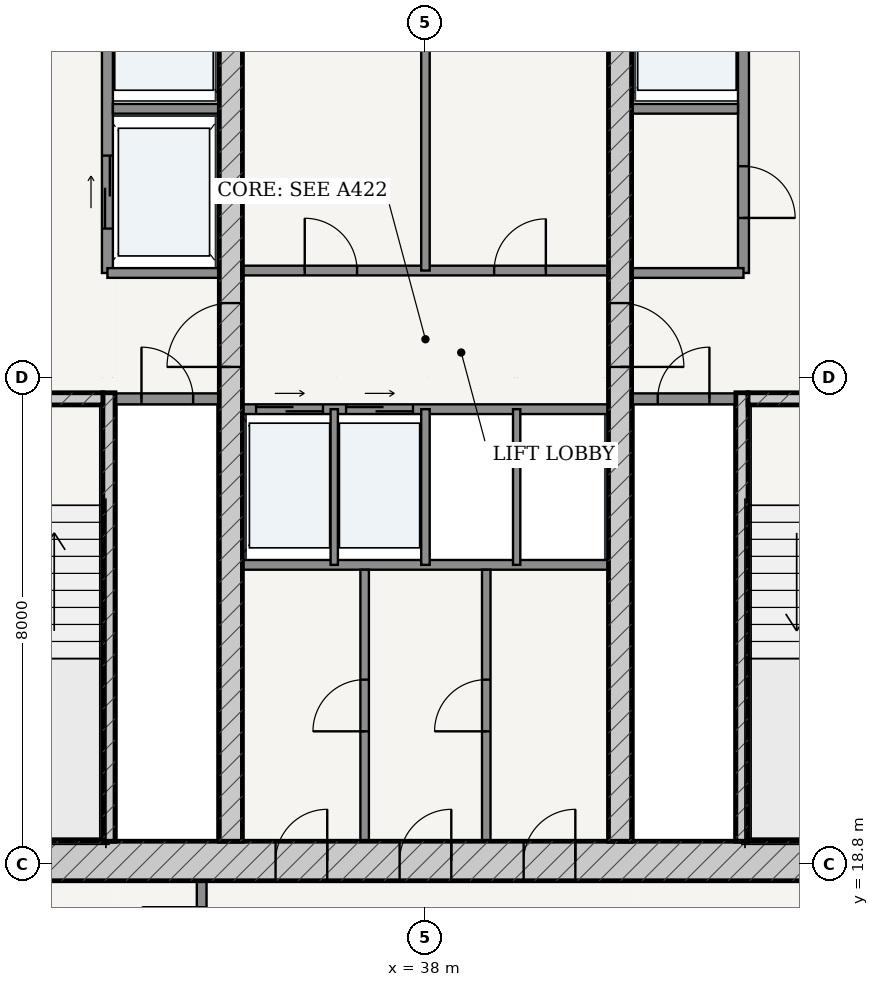
"""IFC4 building model, lengths in metres.
Left out: names, types, materials, properties, quantities, classifications, styles, units other than length and angle.
Written with IfcOpenShell. Run it as: python <this file> out.ifc"""

import sys

from ifc_helpers import new_model, si_unit, direction, frame, frame_2d, origin, place, context, subcontext, project, spatial, rectangle, extrude, source, transform, mapped, element, fill, save


model = new_model("IFC4")
c1 = context("Model", 3, precision=1e-05, world=origin(), true_north=direction((-0.2419218956, 0.970295726276)))
c2 = subcontext(c1, "Body", "Model", "MODEL_VIEW")
j1 = project(units=[si_unit("LENGTHUNIT", "METRE"), si_unit("PLANEANGLEUNIT", "RADIAN")], contexts=[c1])
p1 = place(None, origin())
s1 = spatial("IfcSite", under=j1, at=p1, CompositionType="ELEMENT")
p2 = place(p1, origin())
s2 = spatial("IfcBuilding", under=s1, at=p2, CompositionType="ELEMENT")
p3 = place(p2, frame((0.0, 0.0, 142.6)))
s3 = spatial("IfcBuildingStorey", under=s2, at=p3, CompositionType="ELEMENT", Elevation=142.6)
p4 = place(p3, frame((28.725, 18.85, 0.0), z_axis=(0.0, 0.0, 1.0), x_axis=(1.0, 0.0, 0.0)))
e1 = element("IfcWall", 1, at=p4, inside=s3, PredefinedType="SHEAR", context=c2, shape_type="SweptSolid", body=[
    extrude(rectangle(XDim=18.55, YDim=0.65, at=frame_2d((9.275, 0.0))), origin(), (0.0, 0.0, 1.0), 3.33),
])
p5 = place(p4, frame((6.81, 0.0, 0.0)))
e2 = element("IfcOpeningElement", 2, at=p5, cuts=e1, PredefinedType="OPENING", context=c2, shape_type="SweptSolid", body=[
    extrude(rectangle(XDim=0.85, YDim=2.1, at=frame_2d((0.425, 1.05))), frame((0.0, 0.335, 0.0), z_axis=(0.0, -1.0, 0.0), x_axis=(1.0, 0.0, 0.0)), (0.0, 0.0, 1.0), 0.67),
])
p6 = place(p4, frame((8.85, 0.0, 0.0)))
e3 = element("IfcOpeningElement", 3, at=p6, cuts=e1, PredefinedType="OPENING", context=c2, shape_type="SweptSolid", body=[
    extrude(rectangle(XDim=0.85, YDim=2.1, at=frame_2d((0.425, 1.05))), frame((0.0, 0.335, 0.0), z_axis=(0.0, -1.0, 0.0), x_axis=(1.0, 0.0, 0.0)), (0.0, 0.0, 1.0), 0.67),
])
p7 = place(p4, frame((10.89, 0.0, 0.0)))
e4 = element("IfcOpeningElement", 4, at=p7, cuts=e1, PredefinedType="OPENING", context=c2, shape_type="SweptSolid", body=[
    extrude(rectangle(XDim=0.85, YDim=2.1, at=frame_2d((0.425, 1.05))), frame((0.0, 0.335, 0.0), z_axis=(0.0, -1.0, 0.0), x_axis=(1.0, 0.0, 0.0)), (0.0, 0.0, 1.0), 0.67),
])
p8 = place(p3, frame((32.795, 19.175, 0.0), z_axis=(0.0, 0.0, 1.0), x_axis=(0.0, 1.0, 0.0)))
e5 = element("IfcWall", 5, at=p8, inside=s3, PredefinedType="SOLIDWALL", context=c2, shape_type="SweptSolid", body=[
    extrude(rectangle(XDim=7.375, YDim=0.2, at=frame_2d((3.688, 0.0))), origin(), (0.0, 0.0, 1.0), 3.33),
])
p9 = place(p3, frame((29.375, 26.45, 0.0), z_axis=(0.0, 0.0, 1.0), x_axis=(1.0, 0.0, 0.0)))
e6 = element("IfcWall", 6, at=p9, inside=s3, PredefinedType="SOLIDWALL", context=c2, shape_type="SweptSolid", body=[
    extrude(rectangle(XDim=3.32, YDim=0.2, at=frame_2d((1.66, 0.0))), origin(), (0.0, 0.0, 1.0), 3.33),
])
p10 = place(p9, frame((1.185, 0.0, 0.0)))
e7 = element("IfcOpeningElement", 7, at=p10, cuts=e6, PredefinedType="OPENING", context=c2, shape_type="SweptSolid", body=[
    extrude(rectangle(XDim=0.95, YDim=2.15, at=frame_2d((0.475, 1.075))), frame((0.0, 0.11, 0.0), z_axis=(0.0, -1.0, 0.0), x_axis=(1.0, 0.0, 0.0)), (0.0, 0.0, 1.0), 0.22),
])
p11 = place(p3, frame((43.205, 19.175, 0.0), z_axis=(0.0, 0.0, 1.0), x_axis=(0.0, 1.0, 0.0)))
e8 = element("IfcWall", 8, at=p11, inside=s3, PredefinedType="SOLIDWALL", context=c2, shape_type="SweptSolid", body=[
    extrude(rectangle(XDim=7.375, YDim=0.2, at=frame_2d((3.688, 0.0))), origin(), (0.0, 0.0, 1.0), 3.33),
])
p12 = place(p3, frame((43.305, 26.45, 0.0), z_axis=(0.0, 0.0, 1.0), x_axis=(1.0, 0.0, 0.0)))
e9 = element("IfcWall", 9, at=p12, inside=s3, PredefinedType="SOLIDWALL", context=c2, shape_type="SweptSolid", body=[
    extrude(rectangle(XDim=3.32, YDim=0.2, at=frame_2d((1.66, 0.0))), origin(), (0.0, 0.0, 1.0), 3.33),
])
p13 = place(p12, frame((1.185, 0.0, 0.0)))
e10 = element("IfcOpeningElement", 10, at=p13, cuts=e9, PredefinedType="OPENING", context=c2, shape_type="SweptSolid", body=[
    extrude(rectangle(XDim=0.95, YDim=2.15, at=frame_2d((0.475, 1.075))), frame((0.0, 0.11, 0.0), z_axis=(0.0, -1.0, 0.0), x_axis=(1.0, 0.0, 0.0)), (0.0, 0.0, 1.0), 0.22),
])
p14 = place(p3, frame((34.8, 19.175, 0.0), z_axis=(0.0, 0.0, 1.0), x_axis=(0.0, 1.0, 0.0)))
e11 = element("IfcWall", 11, at=p14, inside=s3, PredefinedType="SHEAR", context=c2, shape_type="SweptSolid", body=[
    extrude(rectangle(XDim=15.25, YDim=0.38, at=frame_2d((7.625, 0.0))), origin(), (0.0, 0.0, 1.0), 3.33),
])
p15 = place(p14, frame((7.8, 0.0, 0.0)))
e12 = element("IfcOpeningElement", 12, at=p15, cuts=e11, PredefinedType="OPENING", context=c2, shape_type="SweptSolid", body=[
    extrude(rectangle(XDim=1.05, YDim=2.15, at=frame_2d((0.525, 1.075))), frame((0.0, 0.2, 0.0), z_axis=(0.0, -1.0, 0.0), x_axis=(1.0, 0.0, 0.0)), (0.0, 0.0, 1.0), 0.4),
])
p16 = place(p3, frame((41.2, 19.175, 0.0), z_axis=(0.0, 0.0, 1.0), x_axis=(0.0, 1.0, 0.0)))
e13 = element("IfcWall", 13, at=p16, inside=s3, PredefinedType="SHEAR", context=c2, shape_type="SweptSolid", body=[
    extrude(rectangle(XDim=15.25, YDim=0.38, at=frame_2d((7.625, 0.0))), origin(), (0.0, 0.0, 1.0), 3.33),
])
p17 = place(p16, frame((7.8, 0.0, 0.0)))
e14 = element("IfcOpeningElement", 14, at=p17, cuts=e13, PredefinedType="OPENING", context=c2, shape_type="SweptSolid", body=[
    extrude(rectangle(XDim=1.05, YDim=2.15, at=frame_2d((0.525, 1.075))), frame((0.0, 0.2, 0.0), z_axis=(0.0, -1.0, 0.0), x_axis=(1.0, 0.0, 0.0)), (0.0, 0.0, 1.0), 0.4),
])
p18 = place(p3, frame((32.9, 26.45, 0.0), z_axis=(0.0, 0.0, 1.0), x_axis=(1.0, 0.0, 0.0)))
e15 = element("IfcWall", 15, at=p18, inside=s3, PredefinedType="PARTITIONING", context=c2, shape_type="SweptSolid", body=[
    extrude(rectangle(XDim=1.71, YDim=0.18, at=frame_2d((0.855, 0.0))), origin(), (0.0, 0.0, 1.0), 3.33),
])
p19 = place(p18, frame((0.43, 0.0, 0.0)))
e16 = element("IfcOpeningElement", 16, at=p19, cuts=e15, PredefinedType="OPENING", context=c2, shape_type="SweptSolid", body=[
    extrude(rectangle(XDim=0.85, YDim=2.1, at=frame_2d((0.425, 1.05))), frame((0.0, 0.1, 0.0), z_axis=(0.0, -1.0, 0.0), x_axis=(1.0, 0.0, 0.0)), (0.0, 0.0, 1.0), 0.2),
])
p20 = place(p3, frame((41.39, 26.45, 0.0), z_axis=(0.0, 0.0, 1.0), x_axis=(1.0, 0.0, 0.0)))
e17 = element("IfcWall", 17, at=p20, inside=s3, PredefinedType="PARTITIONING", context=c2, shape_type="SweptSolid", body=[
    extrude(rectangle(XDim=1.71, YDim=0.18, at=frame_2d((0.855, 0.0))), origin(), (0.0, 0.0, 1.0), 3.33),
])
p21 = place(p20, frame((0.43, 0.0, 0.0)))
e18 = element("IfcOpeningElement", 18, at=p21, cuts=e17, PredefinedType="OPENING", context=c2, shape_type="SweptSolid", body=[
    extrude(rectangle(XDim=0.85, YDim=2.1, at=frame_2d((0.425, 1.05))), frame((0.0, 0.1, 0.0), z_axis=(0.0, -1.0, 0.0), x_axis=(1.0, 0.0, 0.0)), (0.0, 0.0, 1.0), 0.2),
])
p22 = place(p3, frame((32.77, 28.52, 0.0), z_axis=(0.0, 0.0, 1.0), x_axis=(0.0, 1.0, 0.0)))
e19 = element("IfcWall", 19, at=p22, inside=s3, PredefinedType="PARTITIONING", context=c2, shape_type="SweptSolid", body=[
    extrude(rectangle(XDim=5.905, YDim=0.18, at=frame_2d((2.953, 0.0))), origin(), (0.0, 0.0, 1.0), 3.33),
])
p23 = place(p22, frame((3.655, 0.0, 0.0)))
e20 = element("IfcOpeningElement", 20, at=p23, cuts=e19, PredefinedType="OPENING", context=c2, shape_type="SweptSolid", body=[
    extrude(rectangle(XDim=1.15, YDim=2.2, at=frame_2d((0.575, 1.1))), frame((0.0, 0.1, 0.0), z_axis=(0.0, -1.0, 0.0), x_axis=(1.0, 0.0, 0.0)), (0.0, 0.0, 1.0), 0.2),
])
p24 = place(p22, frame((0.73, 0.0, 0.0)))
e21 = element("IfcOpeningElement", 21, at=p24, cuts=e19, PredefinedType="OPENING", context=c2, shape_type="SweptSolid", body=[
    extrude(rectangle(XDim=1.2, YDim=2.25, at=frame_2d((0.6, 1.125))), frame((0.0, 0.1, 0.0), z_axis=(0.0, -1.0, 0.0), x_axis=(1.0, 0.0, 0.0)), (0.0, 0.0, 1.0), 0.2),
])
p25 = place(p3, frame((32.86, 31.22, 0.0), z_axis=(0.0, 0.0, 1.0), x_axis=(1.0, 0.0, 0.0)))
e22 = element("IfcWall", 22, at=p25, inside=s3, PredefinedType="PARTITIONING", context=c2, shape_type="SweptSolid", body=[
    extrude(rectangle(XDim=1.75, YDim=0.16, at=frame_2d((0.875, 0.0))), origin(), (0.0, 0.0, 1.0), 3.33),
])
p26 = place(p3, frame((32.77, 28.52, 0.0), z_axis=(0.0, 0.0, 1.0), x_axis=(1.0, 0.0, 0.0)))
e23 = element("IfcWall", 23, at=p26, inside=s3, PredefinedType="PARTITIONING", context=c2, shape_type="SweptSolid", body=[
    extrude(rectangle(XDim=1.84, YDim=0.16, at=frame_2d((0.92, 0.0))), origin(), (0.0, 0.0, 1.0), 3.33),
])
p27 = place(p3, frame((43.23, 28.52, 0.0), z_axis=(0.0, 0.0, 1.0), x_axis=(0.0, 1.0, 0.0)))
e24 = element("IfcWall", 24, at=p27, inside=s3, PredefinedType="PARTITIONING", context=c2, shape_type="SweptSolid", body=[
    extrude(rectangle(XDim=5.905, YDim=0.18, at=frame_2d((2.953, 0.0))), origin(), (0.0, 0.0, 1.0), 3.33),
])
p28 = place(p27, frame((0.905, 0.0, 0.0)))
e25 = element("IfcOpeningElement", 25, at=p28, cuts=e24, PredefinedType="OPENING", context=c2, shape_type="SweptSolid", body=[
    extrude(rectangle(XDim=0.85, YDim=2.1, at=frame_2d((0.425, 1.05))), frame((0.0, 0.1, 0.0), z_axis=(0.0, -1.0, 0.0), x_axis=(1.0, 0.0, 0.0)), (0.0, 0.0, 1.0), 0.2),
])
p29 = place(p27, frame((3.655, 0.0, 0.0)))
e26 = element("IfcOpeningElement", 26, at=p29, cuts=e24, PredefinedType="OPENING", context=c2, shape_type="SweptSolid", body=[
    extrude(rectangle(XDim=1.15, YDim=2.2, at=frame_2d((0.575, 1.1))), frame((0.0, 0.1, 0.0), z_axis=(0.0, -1.0, 0.0), x_axis=(1.0, 0.0, 0.0)), (0.0, 0.0, 1.0), 0.2),
])
p30 = place(p3, frame((41.39, 31.22, 0.0), z_axis=(0.0, 0.0, 1.0), x_axis=(1.0, 0.0, 0.0)))
e27 = element("IfcWall", 27, at=p30, inside=s3, PredefinedType="PARTITIONING", context=c2, shape_type="SweptSolid", body=[
    extrude(rectangle(XDim=1.75, YDim=0.16, at=frame_2d((0.875, 0.0))), origin(), (0.0, 0.0, 1.0), 3.33),
])
p31 = place(p3, frame((41.39, 28.52, 0.0), z_axis=(0.0, 0.0, 1.0), x_axis=(1.0, 0.0, 0.0)))
e28 = element("IfcWall", 28, at=p31, inside=s3, PredefinedType="PARTITIONING", context=c2, shape_type="SweptSolid", body=[
    extrude(rectangle(XDim=1.84, YDim=0.16, at=frame_2d((0.92, 0.0))), origin(), (0.0, 0.0, 1.0), 3.33),
])
p32 = place(p3, frame((34.99, 28.56, 0.0), z_axis=(0.0, 0.0, 1.0), x_axis=(1.0, 0.0, 0.0)))
e29 = element("IfcWall", 29, at=p32, inside=s3, PredefinedType="PARTITIONING", context=c2, shape_type="SweptSolid", body=[
    extrude(rectangle(XDim=6.02, YDim=0.16, at=frame_2d((3.01, 0.0))), origin(), (0.0, 0.0, 1.0), 3.33),
])
p33 = place(p32, frame((1.025, 0.0, 0.0)))
e30 = element("IfcOpeningElement", 30, at=p33, cuts=e29, PredefinedType="OPENING", context=c2, shape_type="SweptSolid", body=[
    extrude(rectangle(XDim=0.86, YDim=2.1, at=frame_2d((0.43, 1.05))), frame((0.0, 0.09, 0.0), z_axis=(0.0, -1.0, 0.0), x_axis=(1.0, 0.0, 0.0)), (0.0, 0.0, 1.0), 0.18),
])
p34 = place(p32, frame((4.14, 0.0, 0.0)))
e31 = element("IfcOpeningElement", 31, at=p34, cuts=e29, PredefinedType="OPENING", context=c2, shape_type="SweptSolid", body=[
    extrude(rectangle(XDim=0.85, YDim=2.1, at=frame_2d((0.425, 1.05))), frame((0.0, 0.09, 0.0), z_axis=(0.0, -1.0, 0.0), x_axis=(1.0, 0.0, 0.0)), (0.0, 0.0, 1.0), 0.18),
])
p35 = place(p3, frame((38.0, 28.56, 0.0), z_axis=(0.0, 0.0, 1.0), x_axis=(0.0, 1.0, 0.0)))
e32 = element("IfcWall", 32, at=p35, inside=s3, PredefinedType="PARTITIONING", context=c2, shape_type="SweptSolid", body=[
    extrude(rectangle(XDim=5.865, YDim=0.14, at=frame_2d((2.933, 0.0))), origin(), (0.0, 0.0, 1.0), 3.33),
])
p36 = place(p3, frame((34.99, 26.28, 0.0), z_axis=(0.0, 0.0, 1.0), x_axis=(1.0, 0.0, 0.0)))
e33 = element("IfcWall", 33, at=p36, inside=s3, PredefinedType="PARTITIONING", context=c2, shape_type="SweptSolid", body=[
    extrude(rectangle(XDim=6.02, YDim=0.16, at=frame_2d((3.01, 0.0))), origin(), (0.0, 0.0, 1.0), 3.33),
])
p37 = place(p36, frame((0.225, 0.0, 0.0)))
e34 = element("IfcOpeningElement", 34, at=p37, cuts=e33, PredefinedType="OPENING", context=c2, shape_type="SweptSolid", body=[
    extrude(rectangle(XDim=1.1, YDim=2.2, at=frame_2d((0.55, 1.1))), frame((0.0, 0.09, 0.0), z_axis=(0.0, -1.0, 0.0), x_axis=(1.0, 0.0, 0.0)), (0.0, 0.0, 1.0), 0.18),
])
p38 = place(p36, frame((1.705, 0.0, 0.0)))
e35 = element("IfcOpeningElement", 35, at=p38, cuts=e33, PredefinedType="OPENING", context=c2, shape_type="SweptSolid", body=[
    extrude(rectangle(XDim=1.1, YDim=2.2, at=frame_2d((0.55, 1.1))), frame((0.0, 0.09, 0.0), z_axis=(0.0, -1.0, 0.0), x_axis=(1.0, 0.0, 0.0)), (0.0, 0.0, 1.0), 0.18),
])
p39 = place(p3, frame((34.99, 23.72, 0.0), z_axis=(0.0, 0.0, 1.0), x_axis=(1.0, 0.0, 0.0)))
e36 = element("IfcWall", 36, at=p39, inside=s3, PredefinedType="PARTITIONING", context=c2, shape_type="SweptSolid", body=[
    extrude(rectangle(XDim=6.02, YDim=0.16, at=frame_2d((3.01, 0.0))), origin(), (0.0, 0.0, 1.0), 3.33),
])
p40 = place(p3, frame((36.5, 23.72, 0.0), z_axis=(0.0, 0.0, 1.0), x_axis=(0.0, 1.0, 0.0)))
e37 = element("IfcWall", 37, at=p40, inside=s3, PredefinedType="PARTITIONING", context=c2, shape_type="SweptSolid", body=[
    extrude(rectangle(XDim=2.56, YDim=0.12, at=frame_2d((1.28, 0.0))), origin(), (0.0, 0.0, 1.0), 3.33),
])
p41 = place(p3, frame((38.0, 23.72, 0.0), z_axis=(0.0, 0.0, 1.0), x_axis=(0.0, 1.0, 0.0)))
e38 = element("IfcWall", 38, at=p41, inside=s3, PredefinedType="PARTITIONING", context=c2, shape_type="SweptSolid", body=[
    extrude(rectangle(XDim=2.56, YDim=0.14, at=frame_2d((1.28, 0.0))), origin(), (0.0, 0.0, 1.0), 3.33),
])
p42 = place(p3, frame((39.5, 23.72, 0.0), z_axis=(0.0, 0.0, 1.0), x_axis=(0.0, 1.0, 0.0)))
e39 = element("IfcWall", 39, at=p42, inside=s3, PredefinedType="PARTITIONING", context=c2, shape_type="SweptSolid", body=[
    extrude(rectangle(XDim=2.56, YDim=0.12, at=frame_2d((1.28, 0.0))), origin(), (0.0, 0.0, 1.0), 3.33),
])
p43 = place(p3, frame((37.0, 19.175, 0.0), z_axis=(0.0, 0.0, 1.0), x_axis=(0.0, 1.0, 0.0)))
e40 = element("IfcWall", 40, at=p43, inside=s3, PredefinedType="PARTITIONING", context=c2, shape_type="SweptSolid", body=[
    extrude(rectangle(XDim=4.465, YDim=0.14, at=frame_2d((2.232, 0.0))), origin(), (0.0, 0.0, 1.0), 3.33),
])
p44 = place(p43, frame((1.808, 0.0, 0.0)))
e41 = element("IfcOpeningElement", 41, at=p44, cuts=e40, PredefinedType="OPENING", context=c2, shape_type="SweptSolid", body=[
    extrude(rectangle(XDim=0.85, YDim=2.1, at=frame_2d((0.425, 1.05))), frame((0.0, 0.08, 0.0), z_axis=(0.0, -1.0, 0.0), x_axis=(1.0, 0.0, 0.0)), (0.0, 0.0, 1.0), 0.16),
])
p45 = place(p3, frame((39.0, 19.175, 0.0), z_axis=(0.0, 0.0, 1.0), x_axis=(0.0, 1.0, 0.0)))
e42 = element("IfcWall", 42, at=p45, inside=s3, PredefinedType="PARTITIONING", context=c2, shape_type="SweptSolid", body=[
    extrude(rectangle(XDim=4.465, YDim=0.14, at=frame_2d((2.232, 0.0))), origin(), (0.0, 0.0, 1.0), 3.33),
])
p46 = place(p45, frame((1.808, 0.0, 0.0)))
e43 = element("IfcOpeningElement", 43, at=p46, cuts=e42, PredefinedType="OPENING", context=c2, shape_type="SweptSolid", body=[
    extrude(rectangle(XDim=0.85, YDim=2.1, at=frame_2d((0.425, 1.05))), frame((0.0, 0.08, 0.0), z_axis=(0.0, -1.0, 0.0), x_axis=(1.0, 0.0, 0.0)), (0.0, 0.0, 1.0), 0.16),
])
p47 = place(p3, frame((34.32, 16.675, 0.0), z_axis=(0.0, 0.0, 1.0), x_axis=(0.0, 1.0, 0.0)))
e44 = element("IfcWall", 44, at=p47, inside=s3, PredefinedType="PARTITIONING", context=c2, shape_type="SweptSolid", body=[
    extrude(rectangle(XDim=1.85, YDim=0.16, at=frame_2d((0.925, 0.0))), origin(), (0.0, 0.0, 1.0), 3.33),
])
p48 = place(p47, frame((0.435, 0.0, 0.0)))
e45 = element("IfcOpeningElement", 45, at=p48, cuts=e44, PredefinedType="OPENING", context=c2, shape_type="SweptSolid", body=[
    extrude(rectangle(XDim=0.98, YDim=2.2, at=frame_2d((0.49, 1.1))), frame((0.0, 0.09, 0.0), z_axis=(0.0, -1.0, 0.0), x_axis=(1.0, 0.0, 0.0)), (0.0, 0.0, 1.0), 0.18),
])
m1 = source(origin(), c2, "Body", "SweptSolid", [
    extrude(rectangle(XDim=1.05, YDim=2.15, at=frame_2d((0.525, 1.075))), frame((0.0, 0.025, 0.0), z_axis=(0.0, -1.0, 0.0), x_axis=(1.0, 0.0, 0.0)), (0.0, 0.0, 1.0), 0.05),
])
p49 = place(p15, origin())
e46 = element("IfcDoor", 46, at=p49, inside=s3, OperationType="SINGLE_SWING_LEFT", PredefinedType="DOOR", context=c2, shape_type="MappedRepresentation", body=[
    mapped(m1, transform((0.0, 0.0, 0.0), scale=1.0)),
])
fill(e12, e46)
p50 = place(p17, frame((1.05, 0.0, 0.0), z_axis=(0.0, 0.0, 1.0), x_axis=(-1.0, 0.0, 0.0)))
e47 = element("IfcDoor", 47, at=p50, inside=s3, OperationType="SINGLE_SWING_RIGHT", PredefinedType="DOOR", context=c2, shape_type="MappedRepresentation", body=[
    mapped(m1, transform((0.0, 0.0, 0.0), scale=1.0)),
])
fill(e14, e47)
m2 = source(origin(), c2, "Body", "SweptSolid", [
    extrude(rectangle(XDim=0.85, YDim=2.1, at=frame_2d((0.425, 1.05))), frame((0.0, 0.025, 0.0), z_axis=(0.0, -1.0, 0.0), x_axis=(1.0, 0.0, 0.0)), (0.0, 0.0, 1.0), 0.05),
])
p51 = place(p19, origin())
e48 = element("IfcDoor", 48, at=p51, inside=s3, OperationType="SINGLE_SWING_LEFT", PredefinedType="DOOR", context=c2, shape_type="MappedRepresentation", body=[
    mapped(m2, transform((0.0, 0.0, 0.0), scale=1.0)),
])
fill(e16, e48)
p52 = place(p21, origin())
e49 = element("IfcDoor", 49, at=p52, inside=s3, OperationType="SINGLE_SWING_RIGHT", PredefinedType="DOOR", context=c2, shape_type="MappedRepresentation", body=[
    mapped(m2, transform((0.0, 0.0, 0.0), scale=1.0)),
])
fill(e18, e49)
p53 = place(p28, frame((0.85, 0.0, 0.0), z_axis=(0.0, 0.0, 1.0), x_axis=(-1.0, 0.0, 0.0)))
e50 = element("IfcDoor", 50, at=p53, inside=s3, OperationType="SINGLE_SWING_RIGHT", PredefinedType="DOOR", context=c2, shape_type="MappedRepresentation", body=[
    mapped(m2, transform((0.0, 0.0, 0.0), scale=1.0)),
])
fill(e25, e50)
m3 = source(origin(), c2, "Body", "SweptSolid", [
    extrude(rectangle(XDim=0.86, YDim=2.1, at=frame_2d((0.43, 1.05))), frame((0.0, 0.025, 0.0), z_axis=(0.0, -1.0, 0.0), x_axis=(1.0, 0.0, 0.0)), (0.0, 0.0, 1.0), 0.05),
])
p54 = place(p33, origin())
e51 = element("IfcDoor", 51, at=p54, inside=s3, OperationType="SINGLE_SWING_LEFT", PredefinedType="DOOR", context=c2, shape_type="MappedRepresentation", body=[
    mapped(m3, transform((0.0, 0.0, 0.0), scale=1.0)),
])
fill(e30, e51)
p55 = place(p34, origin())
e52 = element("IfcDoor", 52, at=p55, inside=s3, OperationType="SINGLE_SWING_RIGHT", PredefinedType="DOOR", context=c2, shape_type="MappedRepresentation", body=[
    mapped(m2, transform((0.0, 0.0, 0.0), scale=1.0)),
])
fill(e31, e52)
p56 = place(p5, origin())
e53 = element("IfcDoor", 53, at=p56, inside=s3, OperationType="SINGLE_SWING_RIGHT", PredefinedType="DOOR", context=c2, shape_type="MappedRepresentation", body=[
    mapped(m2, transform((0.0, 0.0, 0.0), scale=1.0)),
])
fill(e2, e53)
p57 = place(p6, origin())
e54 = element("IfcDoor", 54, at=p57, inside=s3, OperationType="SINGLE_SWING_RIGHT", PredefinedType="DOOR", context=c2, shape_type="MappedRepresentation", body=[
    mapped(m2, transform((0.0, 0.0, 0.0), scale=1.0)),
])
fill(e3, e54)
p58 = place(p7, origin())
e55 = element("IfcDoor", 55, at=p58, inside=s3, OperationType="SINGLE_SWING_RIGHT", PredefinedType="DOOR", context=c2, shape_type="MappedRepresentation", body=[
    mapped(m2, transform((0.0, 0.0, 0.0), scale=1.0)),
])
fill(e4, e55)
p59 = place(p44, origin())
e56 = element("IfcDoor", 56, at=p59, inside=s3, OperationType="SINGLE_SWING_LEFT", PredefinedType="DOOR", context=c2, shape_type="MappedRepresentation", body=[
    mapped(m2, transform((0.0, 0.0, 0.0), scale=1.0)),
])
fill(e41, e56)
p60 = place(p46, origin())
e57 = element("IfcDoor", 57, at=p60, inside=s3, OperationType="SINGLE_SWING_LEFT", PredefinedType="DOOR", context=c2, shape_type="MappedRepresentation", body=[
    mapped(m2, transform((0.0, 0.0, 0.0), scale=1.0)),
])
fill(e43, e57)
m4 = source(origin(), c2, "Body", "SweptSolid", [
    extrude(rectangle(XDim=1.2, YDim=2.25, at=frame_2d((0.6, 1.125))), frame((0.0, 0.025, 0.0), z_axis=(0.0, -1.0, 0.0), x_axis=(1.0, 0.0, 0.0)), (0.0, 0.0, 1.0), 0.05),
])
p61 = place(p24, origin())
e58 = element("IfcDoor", 58, at=p61, inside=s3, OperationType="DOUBLE_DOOR_SLIDING", PredefinedType="DOOR", context=c2, shape_type="MappedRepresentation", body=[
    mapped(m4, transform((0.0, 0.0, 0.0), scale=1.0)),
])
fill(e21, e58)
m5 = source(origin(), c2, "Body", "SweptSolid", [
    extrude(rectangle(XDim=1.1, YDim=2.2, at=frame_2d((0.55, 1.1))), frame((0.0, 0.025, 0.0), z_axis=(0.0, -1.0, 0.0), x_axis=(1.0, 0.0, 0.0)), (0.0, 0.0, 1.0), 0.05),
])
p62 = place(p37, origin())
e59 = element("IfcDoor", 59, at=p62, inside=s3, OperationType="DOUBLE_DOOR_SLIDING", PredefinedType="DOOR", context=c2, shape_type="MappedRepresentation", body=[
    mapped(m5, transform((0.0, 0.0, 0.0), scale=1.0)),
])
fill(e34, e59)
p63 = place(p38, origin())
e60 = element("IfcDoor", 60, at=p63, inside=s3, OperationType="DOUBLE_DOOR_SLIDING", PredefinedType="DOOR", context=c2, shape_type="MappedRepresentation", body=[
    mapped(m5, transform((0.0, 0.0, 0.0), scale=1.0)),
])
fill(e35, e60)
m6 = source(origin(), c2, "Body", "SweptSolid", [
    extrude(rectangle(XDim=0.98, YDim=2.2, at=frame_2d((0.49, 1.1))), frame((0.0, 0.025, 0.0), z_axis=(0.0, -1.0, 0.0), x_axis=(1.0, 0.0, 0.0)), (0.0, 0.0, 1.0), 0.05),
])
p64 = place(p48, origin())
e61 = element("IfcDoor", 61, at=p64, inside=s3, OperationType="SINGLE_SWING_RIGHT", PredefinedType="DOOR", context=c2, shape_type="MappedRepresentation", body=[
    mapped(m6, transform((0.0, 0.0, 0.0), scale=1.0)),
])
fill(e45, e61)
save(model, sys.argv[1])
